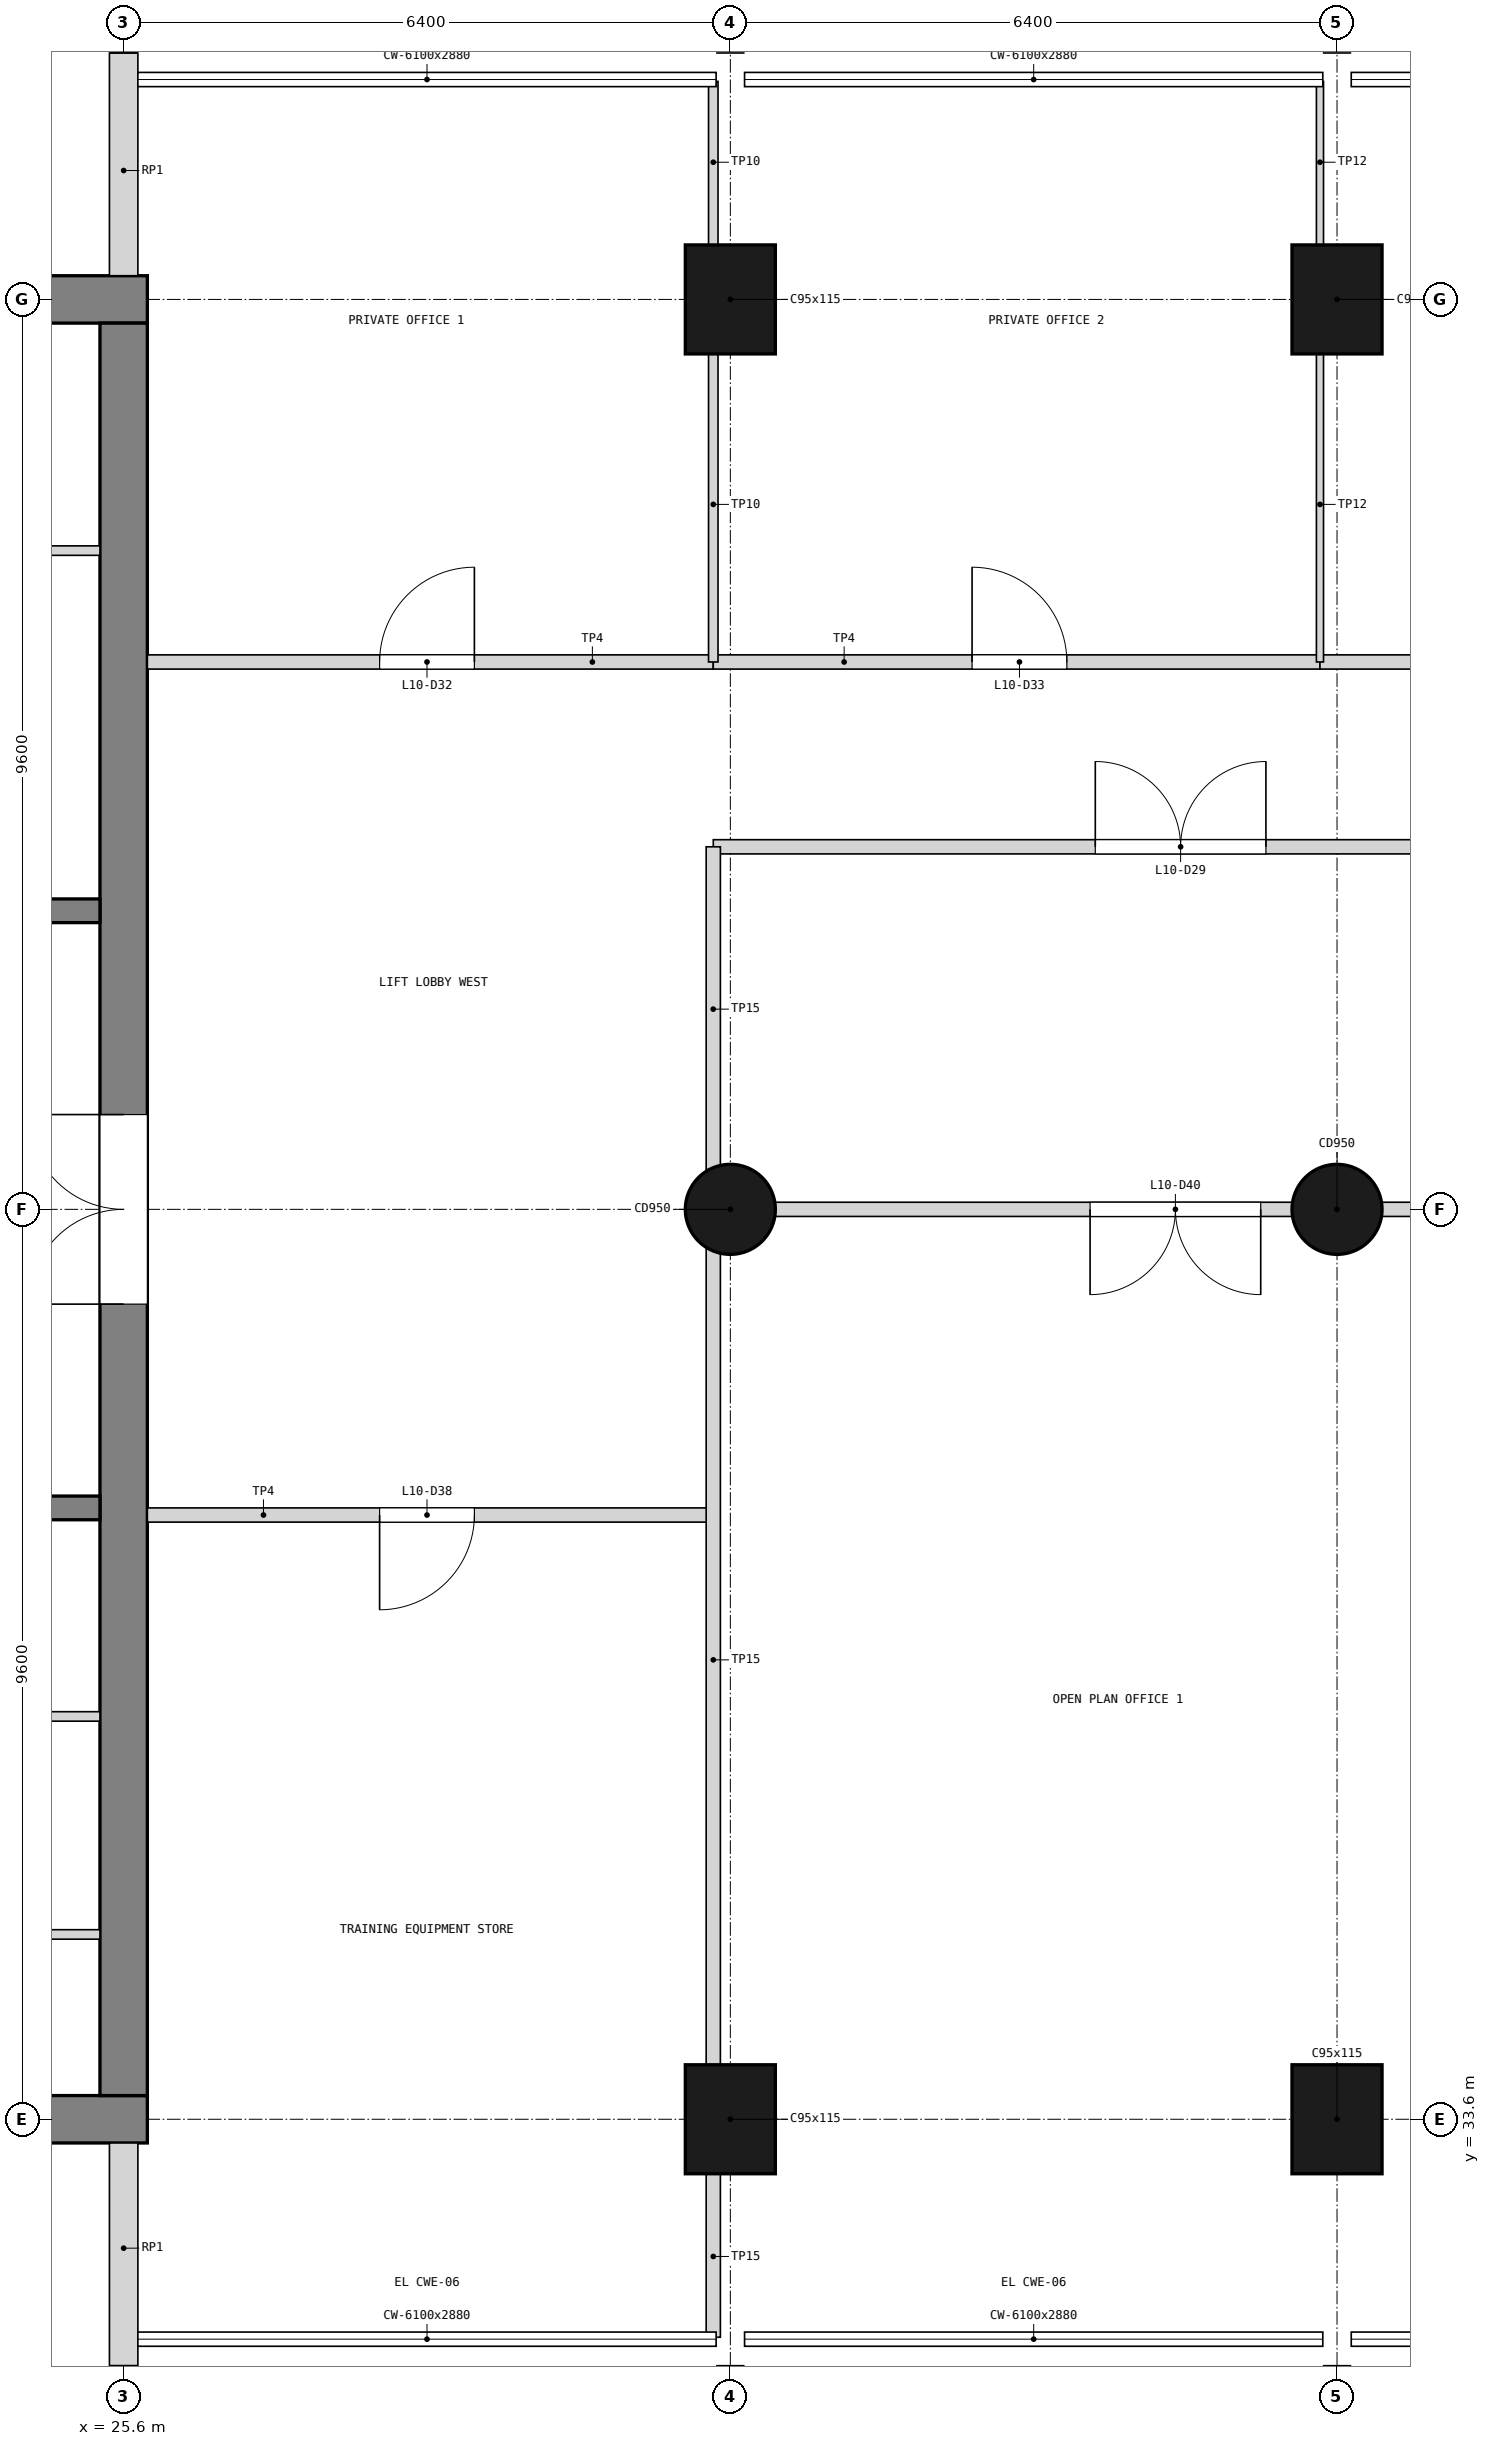
"""IFC4 building model, lengths in metres.
Left out: names, types, materials, properties, quantities, classifications, styles, units other than length and angle.
Written with IfcOpenShell. Run it as: python <this file> out.ifc"""

import sys

from ifc_helpers import new_model, si_unit, direction, frame, frame_2d, origin, origin_2d, place, context, subcontext, project, spatial, rectangle, circle, extrude, element, fill, save


model = new_model("IFC4")
c1 = context("Model", 3, precision=1e-05, world=origin(), true_north=direction((0.0, 1.0)))
c2 = subcontext(c1, "Body", "Model", "MODEL_VIEW")
j1 = project(units=[si_unit("LENGTHUNIT", "METRE"), si_unit("PLANEANGLEUNIT", "RADIAN")], contexts=[c1])
p1 = place(None, origin())
s1 = spatial("IfcSite", under=j1, at=p1, CompositionType="ELEMENT")
p2 = place(p1, origin())
s2 = spatial("IfcBuilding", under=s1, at=p2, CompositionType="ELEMENT")
p3 = place(p2, frame((0.0, 0.0, 40.5)))
s3 = spatial("IfcBuildingStorey", under=s2, at=p3, CompositionType="ELEMENT", Elevation=40.5)
p4 = place(p3, frame((12.55, 52.8, 0.0), z_axis=(0.0, 0.0, 1.0), x_axis=(1.0, 0.0, 0.0)))
e1 = element("IfcWall", 1, at=p4, inside=s3, PredefinedType="SHEAR", context=c2, shape_type="SweptSolid", body=[
    extrude(rectangle(XDim=13.3, YDim=0.5, at=frame_2d((6.65, 0.0))), origin(), (0.0, 0.0, 1.0), 3.9),
])
p5 = place(p4, frame((1.85, 0.0, 1.0)))
e2 = element("IfcOpeningElement", 2, at=p5, cuts=e1, PredefinedType="OPENING", context=c2, shape_type="SweptSolid", body=[
    extrude(rectangle(XDim=0.4, YDim=2.0, at=frame_2d((0.2, 1.0))), frame((0.0, 0.26, 0.0), z_axis=(0.0, -1.0, 0.0), x_axis=(1.0, 0.0, 0.0)), (0.0, 0.0, 1.0), 0.52),
])
p6 = place(p3, frame((12.55, 33.6, 0.0), z_axis=(0.0, 0.0, 1.0), x_axis=(1.0, 0.0, 0.0)))
e3 = element("IfcWall", 3, at=p6, inside=s3, PredefinedType="SHEAR", context=c2, shape_type="SweptSolid", body=[
    extrude(rectangle(XDim=13.3, YDim=0.5, at=frame_2d((6.65, 0.0))), origin(), (0.0, 0.0, 1.0), 3.9),
])
p7 = place(p6, frame((1.85, 0.0, 1.0)))
e4 = element("IfcOpeningElement", 4, at=p7, cuts=e3, PredefinedType="OPENING", context=c2, shape_type="SweptSolid", body=[
    extrude(rectangle(XDim=0.4, YDim=2.0, at=frame_2d((0.2, 1.0))), frame((0.0, 0.26, 0.0), z_axis=(0.0, -1.0, 0.0), x_axis=(1.0, 0.0, 0.0)), (0.0, 0.0, 1.0), 0.52),
])
p8 = place(p3, frame((25.6, 33.85, 0.0), z_axis=(0.0, 0.0, 1.0), x_axis=(0.0, 1.0, 0.0)))
e5 = element("IfcWall", 5, at=p8, inside=s3, PredefinedType="SHEAR", context=c2, shape_type="SweptSolid", body=[
    extrude(rectangle(XDim=18.7, YDim=0.5, at=frame_2d((9.35, 0.0))), origin(), (0.0, 0.0, 1.0), 3.9),
])
p9 = place(p8, frame((8.35, 0.0, 0.0)))
e6 = element("IfcOpeningElement", 6, at=p9, cuts=e5, PredefinedType="OPENING", context=c2, shape_type="SweptSolid", body=[
    extrude(rectangle(XDim=2.0, YDim=2.1, at=frame_2d((1.0, 1.05))), frame((0.0, 0.26, 0.0), z_axis=(0.0, -1.0, 0.0), x_axis=(1.0, 0.0, 0.0)), (0.0, 0.0, 1.0), 0.52),
])
p10 = place(p3, frame((32.0, 33.6, 0.0), z_axis=(0.0, 0.0, 1.0), x_axis=(1.0, 0.0, 0.0)))
e7 = element("IfcColumn", 7, at=p10, inside=s3, PredefinedType="COLUMN", context=c2, shape_type="SweptSolid", body=[
    extrude(rectangle(XDim=0.95, YDim=1.15, at=origin_2d()), origin(), (0.0, 0.0, 1.0), 3.9),
])
p11 = place(p3, frame((32.0, 43.2, 0.0), z_axis=(0.0, 0.0, 1.0), x_axis=(1.0, 0.0, 0.0)))
e8 = element("IfcColumn", 8, at=p11, inside=s3, PredefinedType="COLUMN", context=c2, shape_type="SweptSolid", body=[
    extrude(circle(Radius=0.475, at=origin_2d()), origin(), (0.0, 0.0, 1.0), 3.9),
])
for number, where, z_axis, x_axis in (
    (9, (32.0, 52.8, 0.0), (0.0, 0.0, 1.0), (1.0, 0.0, 0.0)),
    (10, (38.4, 33.6, 0.0), (0.0, 0.0, 1.0), (1.0, 0.0, 0.0)),
):
    element("IfcColumn", number, at=place(p3, frame(where, z_axis=z_axis, x_axis=x_axis)), inside=s3, PredefinedType="COLUMN", context=c2, shape_type="SweptSolid", body=[
        extrude(rectangle(XDim=0.95, YDim=1.15, at=origin_2d()), origin(), (0.0, 0.0, 1.0), 3.9),
    ])
p12 = place(p3, frame((38.4, 43.2, 0.0), z_axis=(0.0, 0.0, 1.0), x_axis=(1.0, 0.0, 0.0)))
e11 = element("IfcColumn", 11, at=p12, inside=s3, PredefinedType="COLUMN", context=c2, shape_type="SweptSolid", body=[
    extrude(circle(Radius=0.475, at=origin_2d()), origin(), (0.0, 0.0, 1.0), 3.9),
])
p13 = place(p3, frame((38.4, 52.8, 0.0), z_axis=(0.0, 0.0, 1.0), x_axis=(1.0, 0.0, 0.0)))
e12 = element("IfcColumn", 12, at=p13, inside=s3, PredefinedType="COLUMN", context=c2, shape_type="SweptSolid", body=[
    extrude(rectangle(XDim=0.95, YDim=1.15, at=origin_2d()), origin(), (0.0, 0.0, 1.0), 3.9),
])
p14 = place(p3, frame((25.6, 31.0, 0.0), z_axis=(0.0, 0.0, 1.0), x_axis=(0.0, 1.0, 0.0)))
e13 = element("IfcWall", 13, at=p14, inside=s3, PredefinedType="SOLIDWALL", context=c2, shape_type="SweptSolid", body=[
    extrude(rectangle(XDim=2.35, YDim=0.3, at=frame_2d((1.175, 0.0))), origin(), (0.0, 0.0, 1.0), 2.88),
])
p15 = place(p3, frame((25.6, 53.05, 0.0), z_axis=(0.0, 0.0, 1.0), x_axis=(0.0, 1.0, 0.0)))
e14 = element("IfcWall", 14, at=p15, inside=s3, PredefinedType="SOLIDWALL", context=c2, shape_type="SweptSolid", body=[
    extrude(rectangle(XDim=2.35, YDim=0.3, at=frame_2d((1.175, 0.0))), origin(), (0.0, 0.0, 1.0), 2.88),
])
for number, where, z_axis, x_axis in (
    (15, (19.875, 40.05, 0.0), (0.0, 0.0, 1.0), (1.0, 0.0, 0.0)),
    (16, (19.875, 46.35, 0.0), (0.0, 0.0, 1.0), (1.0, 0.0, 0.0)),
):
    element("IfcWall", number, at=place(p3, frame(where, z_axis=z_axis, x_axis=x_axis)), inside=s3, PredefinedType="SOLIDWALL", context=c2, shape_type="SweptSolid", body=[
        extrude(rectangle(XDim=5.475, YDim=0.25, at=frame_2d((2.738, 0.0))), origin(), (0.0, 0.0, 1.0), 3.6),
    ])
p16 = place(p3, frame((20.125, 35.55, 0.0), z_axis=(0.0, 0.0, 1.0), x_axis=(1.0, 0.0, 0.0)))
e17 = element("IfcWall", 17, at=p16, inside=s3, PredefinedType="PARTITIONING", context=c2, shape_type="SweptSolid", body=[
    extrude(rectangle(XDim=5.225, YDim=0.1, at=frame_2d((2.613, 0.0))), origin(), (0.0, 0.0, 1.0), 3.6),
])
p17 = place(p3, frame((21.675, 37.85, 0.0), z_axis=(0.0, 0.0, 1.0), x_axis=(1.0, 0.0, 0.0)))
e18 = element("IfcWall", 18, at=p17, inside=s3, PredefinedType="PARTITIONING", context=c2, shape_type="SweptSolid", body=[
    extrude(rectangle(XDim=3.675, YDim=0.1, at=frame_2d((1.837, 0.0))), origin(), (0.0, 0.0, 1.0), 3.6),
])
p18 = place(p3, frame((20.125, 50.15, 0.0), z_axis=(0.0, 0.0, 1.0), x_axis=(1.0, 0.0, 0.0)))
e19 = element("IfcWall", 19, at=p18, inside=s3, PredefinedType="PARTITIONING", context=c2, shape_type="SweptSolid", body=[
    extrude(rectangle(XDim=5.225, YDim=0.1, at=frame_2d((2.613, 0.0))), origin(), (0.0, 0.0, 1.0), 3.6),
])
p19 = place(p3, frame((31.82, 47.025, 0.0), z_axis=(0.0, 0.0, 1.0), x_axis=(1.0, 0.0, 0.0)))
e20 = element("IfcWall", 20, at=p19, inside=s3, PredefinedType="PARTITIONING", context=c2, shape_type="SweptSolid", body=[
    extrude(rectangle(XDim=19.56, YDim=0.15, at=frame_2d((9.78, 0.0))), origin(), (0.0, 0.0, 1.0), 3.68),
])
p20 = place(p19, frame((4.03, 0.0, 0.0)))
e21 = element("IfcOpeningElement", 21, at=p20, cuts=e20, PredefinedType="OPENING", context=c2, shape_type="SweptSolid", body=[
    extrude(rectangle(XDim=1.8, YDim=2.1, at=frame_2d((0.9, 1.05))), frame((0.0, 0.085, 0.0), z_axis=(0.0, -1.0, 0.0), x_axis=(1.0, 0.0, 0.0)), (0.0, 0.0, 1.0), 0.17),
])
p21 = place(p19, frame((13.73, 0.0, 0.0)))
e22 = element("IfcOpeningElement", 22, at=p21, cuts=e20, PredefinedType="OPENING", context=c2, shape_type="SweptSolid", body=[
    extrude(rectangle(XDim=1.8, YDim=2.1, at=frame_2d((0.9, 1.05))), frame((0.0, 0.085, 0.0), z_axis=(0.0, -1.0, 0.0), x_axis=(1.0, 0.0, 0.0)), (0.0, 0.0, 1.0), 0.17),
])
p22 = place(p3, frame((25.85, 48.975, 0.0), z_axis=(0.0, 0.0, 1.0), x_axis=(1.0, 0.0, 0.0)))
e23 = element("IfcWall", 23, at=p22, inside=s3, PredefinedType="PARTITIONING", context=c2, shape_type="SweptSolid", body=[
    extrude(rectangle(XDim=5.97, YDim=0.15, at=frame_2d((2.985, 0.0))), origin(), (0.0, 0.0, 1.0), 3.68),
])
p23 = place(p22, frame((2.45, 0.0, 0.0)))
e24 = element("IfcOpeningElement", 24, at=p23, cuts=e23, PredefinedType="OPENING", context=c2, shape_type="SweptSolid", body=[
    extrude(rectangle(XDim=1.0, YDim=2.1, at=frame_2d((0.5, 1.05))), frame((0.0, 0.085, 0.0), z_axis=(0.0, -1.0, 0.0), x_axis=(1.0, 0.0, 0.0)), (0.0, 0.0, 1.0), 0.17),
])
p24 = place(p3, frame((31.82, 48.975, 0.0), z_axis=(0.0, 0.0, 1.0), x_axis=(1.0, 0.0, 0.0)))
e25 = element("IfcWall", 25, at=p24, inside=s3, PredefinedType="PARTITIONING", context=c2, shape_type="SweptSolid", body=[
    extrude(rectangle(XDim=6.4, YDim=0.15, at=frame_2d((3.2, 0.0))), origin(), (0.0, 0.0, 1.0), 3.68),
])
p25 = place(p24, frame((2.73, 0.0, 0.0)))
e26 = element("IfcOpeningElement", 26, at=p25, cuts=e25, PredefinedType="OPENING", context=c2, shape_type="SweptSolid", body=[
    extrude(rectangle(XDim=1.0, YDim=2.1, at=frame_2d((0.5, 1.05))), frame((0.0, 0.085, 0.0), z_axis=(0.0, -1.0, 0.0), x_axis=(1.0, 0.0, 0.0)), (0.0, 0.0, 1.0), 0.17),
])
p26 = place(p3, frame((38.22, 48.975, 0.0), z_axis=(0.0, 0.0, 1.0), x_axis=(1.0, 0.0, 0.0)))
e27 = element("IfcWall", 27, at=p26, inside=s3, PredefinedType="PARTITIONING", context=c2, shape_type="SweptSolid", body=[
    extrude(rectangle(XDim=6.4, YDim=0.15, at=frame_2d((3.2, 0.0))), origin(), (0.0, 0.0, 1.0), 3.68),
])
p27 = place(p26, frame((2.68, 0.0, 0.0)))
e28 = element("IfcOpeningElement", 28, at=p27, cuts=e27, PredefinedType="OPENING", context=c2, shape_type="SweptSolid", body=[
    extrude(rectangle(XDim=1.0, YDim=2.1, at=frame_2d((0.5, 1.05))), frame((0.0, 0.085, 0.0), z_axis=(0.0, -1.0, 0.0), x_axis=(1.0, 0.0, 0.0)), (0.0, 0.0, 1.0), 0.17),
])
p28 = place(p3, frame((31.82, 48.975, 0.0), z_axis=(0.0, 0.0, 1.0), x_axis=(0.0, 1.0, 0.0)))
e29 = element("IfcWall", 29, at=p28, inside=s3, PredefinedType="PARTITIONING", context=c2, shape_type="SweptSolid", body=[
    extrude(rectangle(XDim=3.27, YDim=0.1, at=frame_2d((1.635, 0.0))), origin(), (0.0, 0.0, 1.0), 2.78),
])
p29 = place(p3, frame((31.82, 53.355, 0.0), z_axis=(0.0, 0.0, 1.0), x_axis=(0.0, 1.0, 0.0)))
e30 = element("IfcWall", 30, at=p29, inside=s3, PredefinedType="PARTITIONING", context=c2, shape_type="SweptSolid", body=[
    extrude(rectangle(XDim=1.745, YDim=0.1, at=frame_2d((0.873, 0.0))), origin(), (0.0, 0.0, 1.0), 2.78),
])
p30 = place(p3, frame((38.22, 48.975, 0.0), z_axis=(0.0, 0.0, 1.0), x_axis=(0.0, 1.0, 0.0)))
e31 = element("IfcWall", 31, at=p30, inside=s3, PredefinedType="PARTITIONING", context=c2, shape_type="SweptSolid", body=[
    extrude(rectangle(XDim=3.27, YDim=0.075, at=frame_2d((1.635, 0.0))), origin(), (0.0, 0.0, 1.0), 2.78),
])
p31 = place(p3, frame((38.22, 53.355, 0.0), z_axis=(0.0, 0.0, 1.0), x_axis=(0.0, 1.0, 0.0)))
e32 = element("IfcWall", 32, at=p31, inside=s3, PredefinedType="PARTITIONING", context=c2, shape_type="SweptSolid", body=[
    extrude(rectangle(XDim=1.745, YDim=0.075, at=frame_2d((0.873, 0.0))), origin(), (0.0, 0.0, 1.0), 2.78),
])
p32 = place(p3, frame((31.82, 43.2, 0.0), z_axis=(0.0, 0.0, 1.0), x_axis=(1.0, 0.0, 0.0)))
e33 = element("IfcWall", 33, at=p32, inside=s3, PredefinedType="PARTITIONING", context=c2, shape_type="SweptSolid", body=[
    extrude(rectangle(XDim=25.96, YDim=0.15, at=frame_2d((12.98, 0.0))), origin(), (0.0, 0.0, 1.0), 2.88),
])
p33 = place(p32, frame((3.975, 0.0, 0.0)))
e34 = element("IfcOpeningElement", 34, at=p33, cuts=e33, PredefinedType="OPENING", context=c2, shape_type="SweptSolid", body=[
    extrude(rectangle(XDim=1.8, YDim=2.1, at=frame_2d((0.9, 1.05))), frame((0.0, 0.085, 0.0), z_axis=(0.0, -1.0, 0.0), x_axis=(1.0, 0.0, 0.0)), (0.0, 0.0, 1.0), 0.17),
])
p34 = place(p32, frame((13.78, 0.0, 0.0)))
e35 = element("IfcOpeningElement", 35, at=p34, cuts=e33, PredefinedType="OPENING", context=c2, shape_type="SweptSolid", body=[
    extrude(rectangle(XDim=1.8, YDim=2.1, at=frame_2d((0.9, 1.05))), frame((0.0, 0.085, 0.0), z_axis=(0.0, -1.0, 0.0), x_axis=(1.0, 0.0, 0.0)), (0.0, 0.0, 1.0), 0.17),
])
p35 = place(p32, frame((17.38, 0.0, 0.0)))
e36 = element("IfcOpeningElement", 36, at=p35, cuts=e33, PredefinedType="OPENING", context=c2, shape_type="SweptSolid", body=[
    extrude(rectangle(XDim=1.0, YDim=2.1, at=frame_2d((0.5, 1.05))), frame((0.0, 0.085, 0.0), z_axis=(0.0, -1.0, 0.0), x_axis=(1.0, 0.0, 0.0)), (0.0, 0.0, 1.0), 0.17),
])
p36 = place(p3, frame((25.85, 39.975, 0.0), z_axis=(0.0, 0.0, 1.0), x_axis=(1.0, 0.0, 0.0)))
e37 = element("IfcWall", 37, at=p36, inside=s3, PredefinedType="PARTITIONING", context=c2, shape_type="SweptSolid", body=[
    extrude(rectangle(XDim=5.97, YDim=0.15, at=frame_2d((2.985, 0.0))), origin(), (0.0, 0.0, 1.0), 3.68),
])
p37 = place(p36, frame((2.45, 0.0, 0.0)))
e38 = element("IfcOpeningElement", 38, at=p37, cuts=e37, PredefinedType="OPENING", context=c2, shape_type="SweptSolid", body=[
    extrude(rectangle(XDim=1.0, YDim=2.1, at=frame_2d((0.5, 1.05))), frame((0.0, 0.085, 0.0), z_axis=(0.0, -1.0, 0.0), x_axis=(1.0, 0.0, 0.0)), (0.0, 0.0, 1.0), 0.17),
])
p38 = place(p3, frame((31.82, 31.3, 0.0), z_axis=(0.0, 0.0, 1.0), x_axis=(0.0, 1.0, 0.0)))
e39 = element("IfcWall", 39, at=p38, inside=s3, PredefinedType="PARTITIONING", context=c2, shape_type="SweptSolid", body=[
    extrude(rectangle(XDim=1.745, YDim=0.15, at=frame_2d((0.873, 0.0))), origin(), (0.0, 0.0, 1.0), 2.78),
])
p39 = place(p3, frame((31.82, 34.155, 0.0), z_axis=(0.0, 0.0, 1.0), x_axis=(0.0, 1.0, 0.0)))
e40 = element("IfcWall", 40, at=p39, inside=s3, PredefinedType="PARTITIONING", context=c2, shape_type="SweptSolid", body=[
    extrude(rectangle(XDim=8.625, YDim=0.15, at=frame_2d((4.313, 0.0))), origin(), (0.0, 0.0, 1.0), 2.78),
])
p40 = place(p3, frame((31.82, 43.62, 0.0), z_axis=(0.0, 0.0, 1.0), x_axis=(0.0, 1.0, 0.0)))
e41 = element("IfcWall", 41, at=p40, inside=s3, PredefinedType="PARTITIONING", context=c2, shape_type="SweptSolid", body=[
    extrude(rectangle(XDim=3.405, YDim=0.15, at=frame_2d((1.703, 0.0))), origin(), (0.0, 0.0, 1.0), 2.78),
])
p41 = place(p9, origin())
e42 = element("IfcDoor", 42, at=p41, inside=s3, OperationType="DOUBLE_DOOR_SINGLE_SWING", PredefinedType="DOOR", context=c2, shape_type="SweptSolid", body=[
    extrude(rectangle(XDim=2.0, YDim=2.1, at=frame_2d((1.0, 1.05))), frame((0.0, 0.025, 0.0), z_axis=(0.0, -1.0, 0.0), x_axis=(1.0, 0.0, 0.0)), (0.0, 0.0, 1.0), 0.05),
])
fill(e6, e42)
p42 = place(p20, origin())
e43 = element("IfcDoor", 43, at=p42, inside=s3, OperationType="DOUBLE_DOOR_SINGLE_SWING", PredefinedType="DOOR", context=c2, shape_type="SweptSolid", body=[
    extrude(rectangle(XDim=1.8, YDim=2.1, at=frame_2d((0.9, 1.05))), frame((0.0, 0.025, 0.0), z_axis=(0.0, -1.0, 0.0), x_axis=(1.0, 0.0, 0.0)), (0.0, 0.0, 1.0), 0.05),
])
fill(e21, e43)
p43 = place(p23, origin())
e44 = element("IfcDoor", 44, at=p43, inside=s3, OperationType="SINGLE_SWING_RIGHT", PredefinedType="DOOR", context=c2, shape_type="SweptSolid", body=[
    extrude(rectangle(XDim=1.0, YDim=2.1, at=frame_2d((0.5, 1.05))), frame((0.0, 0.025, 0.0), z_axis=(0.0, -1.0, 0.0), x_axis=(1.0, 0.0, 0.0)), (0.0, 0.0, 1.0), 0.05),
])
fill(e24, e44)
p44 = place(p25, origin())
e45 = element("IfcDoor", 45, at=p44, inside=s3, OperationType="SINGLE_SWING_LEFT", PredefinedType="DOOR", context=c2, shape_type="SweptSolid", body=[
    extrude(rectangle(XDim=1.0, YDim=2.1, at=frame_2d((0.5, 1.05))), frame((0.0, 0.025, 0.0), z_axis=(0.0, -1.0, 0.0), x_axis=(1.0, 0.0, 0.0)), (0.0, 0.0, 1.0), 0.05),
])
fill(e26, e45)
p45 = place(p37, frame((1.0, 0.0, 0.0), z_axis=(0.0, 0.0, 1.0), x_axis=(-1.0, 0.0, 0.0)))
e46 = element("IfcDoor", 46, at=p45, inside=s3, OperationType="SINGLE_SWING_RIGHT", PredefinedType="DOOR", context=c2, shape_type="SweptSolid", body=[
    extrude(rectangle(XDim=1.0, YDim=2.1, at=frame_2d((0.5, 1.05))), frame((0.0, 0.025, 0.0), z_axis=(0.0, -1.0, 0.0), x_axis=(1.0, 0.0, 0.0)), (0.0, 0.0, 1.0), 0.05),
])
fill(e38, e46)
p46 = place(p33, frame((1.8, 0.0, 0.0), z_axis=(0.0, 0.0, 1.0), x_axis=(-1.0, 0.0, 0.0)))
e47 = element("IfcDoor", 47, at=p46, inside=s3, OperationType="DOUBLE_DOOR_SINGLE_SWING", PredefinedType="DOOR", context=c2, shape_type="SweptSolid", body=[
    extrude(rectangle(XDim=1.8, YDim=2.1, at=frame_2d((0.9, 1.05))), frame((0.0, 0.025, 0.0), z_axis=(0.0, -1.0, 0.0), x_axis=(1.0, 0.0, 0.0)), (0.0, 0.0, 1.0), 0.05),
])
fill(e34, e47)
save(model, sys.argv[1])
